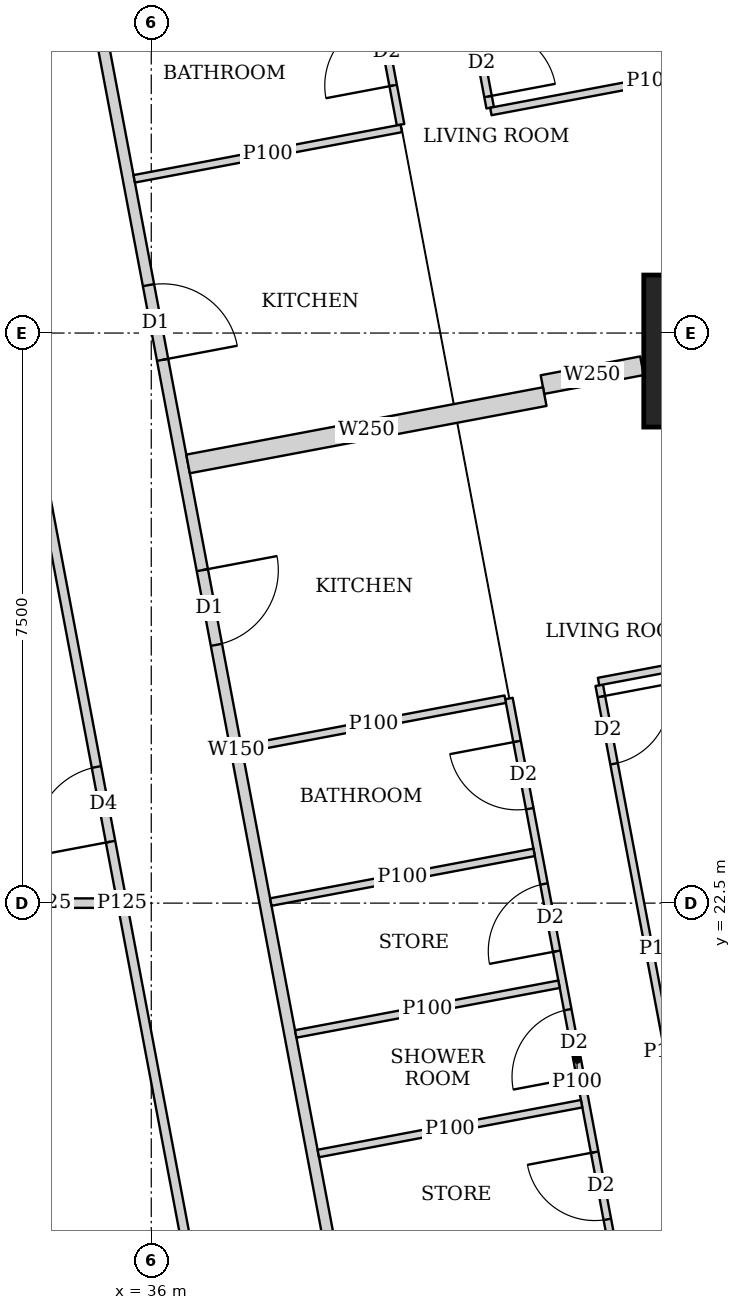
"""IFC4 building model, lengths in metres.
Left out: names, types, materials, properties, quantities, classifications, styles, units other than length and angle.
Written with IfcOpenShell. Run it as: python <this file> out.ifc"""

import sys

from ifc_helpers import new_model, si_unit, direction, frame, frame_2d, origin, origin_2d, place, context, subcontext, project, spatial, rectangle, extrude, element, fill, save


model = new_model("IFC4")
c1 = context("Model", 3, precision=1e-05, world=origin(), true_north=direction((0.0, 1.0)))
c2 = subcontext(c1, "Body", "Model", "MODEL_VIEW")
j1 = project(units=[si_unit("LENGTHUNIT", "METRE"), si_unit("PLANEANGLEUNIT", "RADIAN")], contexts=[c1])
p1 = place(None, origin())
s1 = spatial("IfcSite", under=j1, at=p1, CompositionType="ELEMENT")
p2 = place(p1, origin())
s2 = spatial("IfcBuilding", under=s1, at=p2, CompositionType="ELEMENT")
p3 = place(p2, frame((0.0, 0.0, 281.6)))
s3 = spatial("IfcBuildingStorey", under=s2, at=p3, CompositionType="ELEMENT", Elevation=281.6)
p4 = place(p3, frame((43.48, 29.763, 0.0), z_axis=(0.0, 0.0, 1.0), x_axis=(1.0, 0.0, 0.0)))
e1 = element("IfcColumn", 1, at=p4, inside=s3, PredefinedType="COLUMN", context=c2, shape_type="SweptSolid", body=[
    extrude(rectangle(XDim=2.0, YDim=2.0, at=origin_2d()), origin(), (0.0, 0.0, 1.0), 3.75),
])
p5 = place(p3, frame((33.781, 42.186, 0.0), z_axis=(0.0, 0.0, 1.0), x_axis=(0.185593518645, -0.9826266055, 0.0)))
e2 = element("IfcWall", 2, at=p5, inside=s3, PredefinedType="SOLIDWALL", context=c2, shape_type="SweptSolid", body=[
    extrude(rectangle(XDim=35.961, YDim=0.15, at=frame_2d((17.98, 0.0))), origin(), (0.0, 0.0, 1.0), 2.5),
])
p6 = place(p5, frame((11.76, 0.0, 0.0)))
e3 = element("IfcOpeningElement", 3, at=p6, cuts=e2, PredefinedType="OPENING", context=c2, shape_type="SweptSolid", body=[
    extrude(rectangle(XDim=1.0, YDim=2.1, at=frame_2d((0.5, 1.05))), frame((0.0, 0.085, 0.0), z_axis=(0.0, -1.0, 0.0), x_axis=(1.0, 0.0, 0.0)), (0.0, 0.0, 1.0), 0.17),
])
p7 = place(p5, frame((15.576, 0.0, 0.0)))
e4 = element("IfcOpeningElement", 4, at=p7, cuts=e2, PredefinedType="OPENING", context=c2, shape_type="SweptSolid", body=[
    extrude(rectangle(XDim=1.0, YDim=2.1, at=frame_2d((0.5, 1.05))), frame((0.0, 0.085, 0.0), z_axis=(0.0, -1.0, 0.0), x_axis=(1.0, 0.0, 0.0)), (0.0, 0.0, 1.0), 0.17),
])
p8 = place(p5, frame((30.502, 0.0, 0.0)))
e5 = element("IfcOpeningElement", 5, at=p8, cuts=e2, PredefinedType="OPENING", context=c2, shape_type="SweptSolid", body=[
    extrude(rectangle(XDim=1.0, YDim=2.1, at=frame_2d((0.5, 1.05))), frame((0.0, 0.085, 0.0), z_axis=(0.0, -1.0, 0.0), x_axis=(1.0, 0.0, 0.0)), (0.0, 0.0, 1.0), 0.17),
])
p9 = place(p3, frame((38.744, 42.045, 0.0), z_axis=(0.0, 0.0, 1.0), x_axis=(0.185588352162, -0.982627581305, 0.0)))
e6 = element("IfcWall", 6, at=p9, inside=s3, PredefinedType="PARTITIONING", context=c2, shape_type="SweptSolid", body=[
    extrude(rectangle(XDim=9.241, YDim=0.1, at=frame_2d((4.621, 0.0))), origin(), (0.0, 0.0, 1.0), 3.5),
])
p10 = place(p9, frame((8.191, 0.0, 0.0)))
e7 = element("IfcOpeningElement", 7, at=p10, cuts=e6, PredefinedType="OPENING", context=c2, shape_type="SweptSolid", body=[
    extrude(rectangle(XDim=0.9, YDim=2.1, at=frame_2d((0.45, 1.05))), frame((0.0, 0.06, 0.0), z_axis=(0.0, -1.0, 0.0), x_axis=(1.0, 0.0, 0.0)), (0.0, 0.0, 1.0), 0.12),
])
p11 = place(p9, frame((4.215, 0.0, 0.0)))
e8 = element("IfcOpeningElement", 8, at=p11, cuts=e6, PredefinedType="OPENING", context=c2, shape_type="SweptSolid", body=[
    extrude(rectangle(XDim=0.9, YDim=2.1, at=frame_2d((0.45, 1.05))), frame((0.0, 0.06, 0.0), z_axis=(0.0, -1.0, 0.0), x_axis=(1.0, 0.0, 0.0)), (0.0, 0.0, 1.0), 0.12),
])
p12 = place(p3, frame((37.51, 42.109, 0.0), z_axis=(0.0, 0.0, 1.0), x_axis=(0.185659798122, -0.982614084654, 0.0)))
e9 = element("IfcWall", 9, at=p12, inside=s3, PredefinedType="PARTITIONING", context=c2, shape_type="SweptSolid", body=[
    extrude(rectangle(XDim=9.534, YDim=0.1, at=frame_2d((4.767, 0.0))), origin(), (0.0, 0.0, 1.0), 3.5),
])
p13 = place(p12, frame((8.109, 0.0, 0.0)))
e10 = element("IfcOpeningElement", 10, at=p13, cuts=e9, PredefinedType="OPENING", context=c2, shape_type="SweptSolid", body=[
    extrude(rectangle(XDim=0.9, YDim=2.1, at=frame_2d((0.45, 1.05))), frame((0.0, 0.06, 0.0), z_axis=(0.0, -1.0, 0.0), x_axis=(1.0, 0.0, 0.0)), (0.0, 0.0, 1.0), 0.12),
])
p14 = place(p12, frame((2.65, 0.0, 0.0)))
e11 = element("IfcOpeningElement", 11, at=p14, cuts=e9, PredefinedType="OPENING", context=c2, shape_type="SweptSolid", body=[
    extrude(rectangle(XDim=0.9, YDim=2.1, at=frame_2d((0.45, 1.05))), frame((0.0, 0.06, 0.0), z_axis=(0.0, -1.0, 0.0), x_axis=(1.0, 0.0, 0.0)), (0.0, 0.0, 1.0), 0.12),
])
p15 = place(p12, frame((5.44, 0.0, 0.0)))
e12 = element("IfcOpeningElement", 12, at=p15, cuts=e9, PredefinedType="OPENING", context=c2, shape_type="SweptSolid", body=[
    extrude(rectangle(XDim=0.9, YDim=2.1, at=frame_2d((0.45, 1.05))), frame((0.0, 0.06, 0.0), z_axis=(0.0, -1.0, 0.0), x_axis=(1.0, 0.0, 0.0)), (0.0, 0.0, 1.0), 0.12),
])
p16 = place(p3, frame((44.693, 33.713, 0.0), z_axis=(0.0, 0.0, 1.0), x_axis=(-0.982633535512, -0.185556823879, 0.0)))
e13 = element("IfcWall", 13, at=p16, inside=s3, PredefinedType="PARTITIONING", context=c2, shape_type="SweptSolid", body=[
    extrude(rectangle(XDim=4.3, YDim=0.1, at=frame_2d((2.15, 0.0))), origin(), (0.0, 0.0, 1.0), 2.5),
])
p17 = place(p3, frame((39.289, 32.692, 0.0), z_axis=(0.0, 0.0, 1.0), x_axis=(-0.982662827464, -0.185401638399, 0.0)))
e14 = element("IfcWall", 14, at=p17, inside=s3, PredefinedType="PARTITIONING", context=c2, shape_type="SweptSolid", body=[
    extrude(rectangle(XDim=3.575, YDim=0.1, at=frame_2d((1.788, 0.0))), origin(), (0.0, 0.0, 1.0), 3.5),
])
p18 = place(p3, frame((41.894, 25.366, 0.0), z_axis=(0.0, 0.0, 1.0), x_axis=(0.185612905165, -0.982622943675, 0.0)))
e15 = element("IfcWall", 15, at=p18, inside=s3, PredefinedType="PARTITIONING", context=c2, shape_type="SweptSolid", body=[
    extrude(rectangle(XDim=9.827, YDim=0.1, at=frame_2d((4.913, 0.0))), origin(), (0.0, 0.0, 1.0), 2.5),
])
p19 = place(p18, frame((0.151, 0.0, 0.0)))
e16 = element("IfcOpeningElement", 16, at=p19, cuts=e15, PredefinedType="OPENING", context=c2, shape_type="SweptSolid", body=[
    extrude(rectangle(XDim=0.9, YDim=2.1, at=frame_2d((0.45, 1.05))), frame((0.0, 0.06, 0.0), z_axis=(0.0, -1.0, 0.0), x_axis=(1.0, 0.0, 0.0)), (0.0, 0.0, 1.0), 0.12),
])
p20 = place(p18, frame((5.05, 0.0, 0.0)))
e17 = element("IfcOpeningElement", 17, at=p20, cuts=e15, PredefinedType="OPENING", context=c2, shape_type="SweptSolid", body=[
    extrude(rectangle(XDim=0.9, YDim=2.1, at=frame_2d((0.45, 1.05))), frame((0.0, 0.06, 0.0), z_axis=(0.0, -1.0, 0.0), x_axis=(1.0, 0.0, 0.0)), (0.0, 0.0, 1.0), 0.12),
])
p21 = place(p18, frame((7.783, 0.0, 0.0)))
e18 = element("IfcOpeningElement", 18, at=p21, cuts=e15, PredefinedType="OPENING", context=c2, shape_type="SweptSolid", body=[
    extrude(rectangle(XDim=0.9, YDim=2.1, at=frame_2d((0.45, 1.05))), frame((0.0, 0.06, 0.0), z_axis=(0.0, -1.0, 0.0), x_axis=(1.0, 0.0, 0.0)), (0.0, 0.0, 1.0), 0.12),
])
p22 = place(p3, frame((40.706, 25.192, 0.0), z_axis=(0.0, 0.0, 1.0), x_axis=(0.185629824463, -0.982619747547, 0.0)))
e19 = element("IfcWall", 19, at=p22, inside=s3, PredefinedType="PARTITIONING", context=c2, shape_type="SweptSolid", body=[
    extrude(rectangle(XDim=9.659, YDim=0.1, at=frame_2d((4.83, 0.0))), origin(), (0.0, 0.0, 1.0), 2.5),
])
p23 = place(p22, frame((0.575, 0.0, 0.0)))
e20 = element("IfcOpeningElement", 20, at=p23, cuts=e19, PredefinedType="OPENING", context=c2, shape_type="SweptSolid", body=[
    extrude(rectangle(XDim=0.9, YDim=2.1, at=frame_2d((0.45, 1.05))), frame((0.0, 0.06, 0.0), z_axis=(0.0, -1.0, 0.0), x_axis=(1.0, 0.0, 0.0)), (0.0, 0.0, 1.0), 0.12),
])
p24 = place(p22, frame((4.166, 0.0, 0.0)))
e21 = element("IfcOpeningElement", 21, at=p24, cuts=e19, PredefinedType="OPENING", context=c2, shape_type="SweptSolid", body=[
    extrude(rectangle(XDim=0.9, YDim=2.1, at=frame_2d((0.45, 1.05))), frame((0.0, 0.06, 0.0), z_axis=(0.0, -1.0, 0.0), x_axis=(1.0, 0.0, 0.0)), (0.0, 0.0, 1.0), 0.12),
])
p25 = place(p22, frame((2.483, 0.0, 0.0)))
e22 = element("IfcOpeningElement", 22, at=p25, cuts=e19, PredefinedType="OPENING", context=c2, shape_type="SweptSolid", body=[
    extrude(rectangle(XDim=0.9, YDim=2.1, at=frame_2d((0.45, 1.05))), frame((0.0, 0.06, 0.0), z_axis=(0.0, -1.0, 0.0), x_axis=(1.0, 0.0, 0.0)), (0.0, 0.0, 1.0), 0.12),
])
p26 = place(p22, frame((6.074, 0.0, 0.0)))
e23 = element("IfcOpeningElement", 23, at=p26, cuts=e19, PredefinedType="OPENING", context=c2, shape_type="SweptSolid", body=[
    extrude(rectangle(XDim=0.9, YDim=2.1, at=frame_2d((0.45, 1.05))), frame((0.0, 0.06, 0.0), z_axis=(0.0, -1.0, 0.0), x_axis=(1.0, 0.0, 0.0)), (0.0, 0.0, 1.0), 0.12),
])
p27 = place(p3, frame((46.11, 26.213, 0.0), z_axis=(0.0, 0.0, 1.0), x_axis=(-0.982633535512, -0.185556823879, 0.0)))
e24 = element("IfcWall", 24, at=p27, inside=s3, PredefinedType="PARTITIONING", context=c2, shape_type="SweptSolid", body=[
    extrude(rectangle(XDim=4.3, YDim=0.1, at=frame_2d((2.15, 0.0))), origin(), (0.0, 0.0, 1.0), 2.5),
])
p28 = place(p3, frame((42.887, 21.921, 0.0), z_axis=(0.0, 0.0, 1.0), x_axis=(-0.982688058078, -0.185267861514, 0.0)))
e25 = element("IfcWall", 25, at=p28, inside=s3, PredefinedType="PARTITIONING", context=c2, shape_type="SweptSolid", body=[
    extrude(rectangle(XDim=0.286, YDim=0.1, at=frame_2d((0.143, 0.0))), origin(), (0.0, 0.0, 1.0), 2.5),
])
p29 = place(p3, frame((40.657, 25.183, 0.0), z_axis=(0.0, 0.0, 1.0), x_axis=(-0.982585626838, -0.185810349366, 0.0)))
e26 = element("IfcWall", 26, at=p29, inside=s3, PredefinedType="PARTITIONING", context=c2, shape_type="SweptSolid", body=[
    extrude(rectangle(XDim=3.525, YDim=0.1, at=frame_2d((1.763, 0.0))), origin(), (0.0, 0.0, 1.0), 3.5),
])
p30 = place(p3, frame((41.365, 21.433, 0.0), z_axis=(0.0, 0.0, 1.0), x_axis=(-0.982638553676, -0.185530247748, 0.0)))
e27 = element("IfcWall", 27, at=p30, inside=s3, PredefinedType="PARTITIONING", context=c2, shape_type="SweptSolid", body=[
    extrude(rectangle(XDim=3.525, YDim=0.1, at=frame_2d((1.763, 0.0))), origin(), (0.0, 0.0, 1.0), 3.5),
])
p31 = place(p3, frame((41.037, 23.168, 0.0), z_axis=(0.0, 0.0, 1.0), x_axis=(-0.982638553676, -0.185530247748, 0.0)))
e28 = element("IfcWall", 28, at=p31, inside=s3, PredefinedType="PARTITIONING", context=c2, shape_type="SweptSolid", body=[
    extrude(rectangle(XDim=3.525, YDim=0.1, at=frame_2d((1.763, 0.0))), origin(), (0.0, 0.0, 1.0), 2.5),
])
p32 = place(p3, frame((41.662, 19.861, 0.0), z_axis=(0.0, 0.0, 1.0), x_axis=(-0.982588017646, -0.185797706064, 0.0)))
e29 = element("IfcWall", 29, at=p32, inside=s3, PredefinedType="PARTITIONING", context=c2, shape_type="SweptSolid", body=[
    extrude(rectangle(XDim=3.525, YDim=0.1, at=frame_2d((1.763, 0.0))), origin(), (0.0, 0.0, 1.0), 3.5),
])
p33 = place(p3, frame((42.456, 29.57, 0.0), z_axis=(0.0, 0.0, 1.0), x_axis=(-0.982517742323, -0.18616897169, 0.0)))
e30 = element("IfcWall", 30, at=p33, inside=s3, PredefinedType="SOLIDWALL", context=c2, shape_type="SweptSolid", body=[
    extrude(rectangle(XDim=1.332, YDim=0.25, at=frame_2d((0.666, 0.0))), origin(), (0.0, 0.0, 1.0), 2.5),
])
p34 = place(p3, frame((41.177, 29.164, 0.0), z_axis=(0.0, 0.0, 1.0), x_axis=(-0.982642846239, -0.185507511263, 0.0)))
e31 = element("IfcWall", 31, at=p34, inside=s3, PredefinedType="SOLIDWALL", context=c2, shape_type="SweptSolid", body=[
    extrude(rectangle(XDim=4.776, YDim=0.25, at=frame_2d((2.388, 0.0))), origin(), (0.0, 0.0, 1.0), 2.5),
])
p35 = place(p3, frame((37.947, 10.163, 0.0), z_axis=(0.0, 0.0, 1.0), x_axis=(-0.185572770922, 0.982630523998, 0.0)))
e32 = element("IfcWall", 32, at=p35, inside=s3, PredefinedType="PARTITIONING", context=c2, shape_type="SweptSolid", body=[
    extrude(rectangle(XDim=25.111, YDim=0.125, at=frame_2d((12.556, 0.0))), origin(), (0.0, 0.0, 1.0), 2.5),
])
p36 = place(p35, frame((0.708, 0.0, 0.0)))
e33 = element("IfcOpeningElement", 33, at=p36, cuts=e32, PredefinedType="OPENING", context=c2, shape_type="SweptSolid", body=[
    extrude(rectangle(XDim=1.0, YDim=2.1, at=frame_2d((0.5, 1.05))), frame((0.0, 0.073, 0.0), z_axis=(0.0, -1.0, 0.0), x_axis=(1.0, 0.0, 0.0)), (0.0, 0.0, 1.0), 0.145),
])
p37 = place(p35, frame((5.9, 0.0, 0.0)))
e34 = element("IfcOpeningElement", 34, at=p37, cuts=e32, PredefinedType="OPENING", context=c2, shape_type="SweptSolid", body=[
    extrude(rectangle(XDim=1.0, YDim=2.1, at=frame_2d((0.5, 1.05))), frame((0.0, 0.073, 0.0), z_axis=(0.0, -1.0, 0.0), x_axis=(1.0, 0.0, 0.0)), (0.0, 0.0, 1.0), 0.145),
])
p38 = place(p35, frame((13.378, 0.0, 0.0)))
e35 = element("IfcOpeningElement", 35, at=p38, cuts=e32, PredefinedType="OPENING", context=c2, shape_type="SweptSolid", body=[
    extrude(rectangle(XDim=1.0, YDim=2.1, at=frame_2d((0.5, 1.05))), frame((0.0, 0.073, 0.0), z_axis=(0.0, -1.0, 0.0), x_axis=(1.0, 0.0, 0.0)), (0.0, 0.0, 1.0), 0.145),
])
p39 = place(p35, frame((21.15, 0.0, 0.0)))
e36 = element("IfcOpeningElement", 36, at=p39, cuts=e32, PredefinedType="OPENING", context=c2, shape_type="SweptSolid", body=[
    extrude(rectangle(XDim=1.0, YDim=2.1, at=frame_2d((0.5, 1.05))), frame((0.0, 0.073, 0.0), z_axis=(0.0, -1.0, 0.0), x_axis=(1.0, 0.0, 0.0)), (0.0, 0.0, 1.0), 0.145),
])
p40 = place(p3, frame((33.701, 22.5, 0.0), z_axis=(0.0, 0.0, 1.0), x_axis=(1.0, 0.0, 0.0)))
e37 = element("IfcWall", 37, at=p40, inside=s3, PredefinedType="PARTITIONING", context=c2, shape_type="SweptSolid", body=[
    extrude(rectangle(XDim=1.841, YDim=0.125, at=frame_2d((0.92, 0.0))), origin(), (0.0, 0.0, 1.0), 2.5),
])
p41 = place(p10, origin())
e38 = element("IfcDoor", 38, at=p41, inside=s3, OperationType="SINGLE_SWING_RIGHT", PredefinedType="DOOR", context=c2, shape_type="SweptSolid", body=[
    extrude(rectangle(XDim=0.9, YDim=2.1, at=frame_2d((0.45, 1.05))), frame((0.0, 0.025, 0.0), z_axis=(0.0, -1.0, 0.0), x_axis=(1.0, 0.0, 0.0)), (0.0, 0.0, 1.0), 0.05),
])
fill(e7, e38)
p42 = place(p13, origin())
e39 = element("IfcDoor", 39, at=p42, inside=s3, OperationType="SINGLE_SWING_LEFT", PredefinedType="DOOR", context=c2, shape_type="SweptSolid", body=[
    extrude(rectangle(XDim=0.9, YDim=2.1, at=frame_2d((0.45, 1.05))), frame((0.0, 0.025, 0.0), z_axis=(0.0, -1.0, 0.0), x_axis=(1.0, 0.0, 0.0)), (0.0, 0.0, 1.0), 0.05),
])
fill(e10, e39)
p43 = place(p6, origin())
e40 = element("IfcDoor", 40, at=p43, inside=s3, OperationType="SINGLE_SWING_RIGHT", PredefinedType="DOOR", context=c2, shape_type="SweptSolid", body=[
    extrude(rectangle(XDim=1.0, YDim=2.1, at=frame_2d((0.5, 1.05))), frame((0.0, 0.025, 0.0), z_axis=(0.0, -1.0, 0.0), x_axis=(1.0, 0.0, 0.0)), (0.0, 0.0, 1.0), 0.05),
])
fill(e3, e40)
p44 = place(p19, origin())
e41 = element("IfcDoor", 41, at=p44, inside=s3, OperationType="SINGLE_SWING_LEFT", PredefinedType="DOOR", context=c2, shape_type="SweptSolid", body=[
    extrude(rectangle(XDim=0.9, YDim=2.1, at=frame_2d((0.45, 1.05))), frame((0.0, 0.025, 0.0), z_axis=(0.0, -1.0, 0.0), x_axis=(1.0, 0.0, 0.0)), (0.0, 0.0, 1.0), 0.05),
])
fill(e16, e41)
p45 = place(p23, origin())
e42 = element("IfcDoor", 42, at=p45, inside=s3, OperationType="SINGLE_SWING_RIGHT", PredefinedType="DOOR", context=c2, shape_type="SweptSolid", body=[
    extrude(rectangle(XDim=0.9, YDim=2.1, at=frame_2d((0.45, 1.05))), frame((0.0, 0.025, 0.0), z_axis=(0.0, -1.0, 0.0), x_axis=(1.0, 0.0, 0.0)), (0.0, 0.0, 1.0), 0.05),
])
fill(e20, e42)
p46 = place(p24, origin())
e43 = element("IfcDoor", 43, at=p46, inside=s3, OperationType="SINGLE_SWING_LEFT", PredefinedType="DOOR", context=c2, shape_type="SweptSolid", body=[
    extrude(rectangle(XDim=0.9, YDim=2.1, at=frame_2d((0.45, 1.05))), frame((0.0, 0.025, 0.0), z_axis=(0.0, -1.0, 0.0), x_axis=(1.0, 0.0, 0.0)), (0.0, 0.0, 1.0), 0.05),
])
fill(e21, e43)
p47 = place(p25, origin())
e44 = element("IfcDoor", 44, at=p47, inside=s3, OperationType="SINGLE_SWING_LEFT", PredefinedType="DOOR", context=c2, shape_type="SweptSolid", body=[
    extrude(rectangle(XDim=0.9, YDim=2.1, at=frame_2d((0.45, 1.05))), frame((0.0, 0.025, 0.0), z_axis=(0.0, -1.0, 0.0), x_axis=(1.0, 0.0, 0.0)), (0.0, 0.0, 1.0), 0.05),
])
fill(e22, e44)
p48 = place(p26, origin())
e45 = element("IfcDoor", 45, at=p48, inside=s3, OperationType="SINGLE_SWING_RIGHT", PredefinedType="DOOR", context=c2, shape_type="SweptSolid", body=[
    extrude(rectangle(XDim=0.9, YDim=2.1, at=frame_2d((0.45, 1.05))), frame((0.0, 0.025, 0.0), z_axis=(0.0, -1.0, 0.0), x_axis=(1.0, 0.0, 0.0)), (0.0, 0.0, 1.0), 0.05),
])
fill(e23, e45)
p49 = place(p7, origin())
e46 = element("IfcDoor", 46, at=p49, inside=s3, OperationType="SINGLE_SWING_LEFT", PredefinedType="DOOR", context=c2, shape_type="SweptSolid", body=[
    extrude(rectangle(XDim=1.0, YDim=2.1, at=frame_2d((0.5, 1.05))), frame((0.0, 0.025, 0.0), z_axis=(0.0, -1.0, 0.0), x_axis=(1.0, 0.0, 0.0)), (0.0, 0.0, 1.0), 0.05),
])
fill(e4, e46)
p50 = place(p38, origin())
e47 = element("IfcDoor", 47, at=p50, inside=s3, OperationType="SINGLE_SWING_LEFT", PredefinedType="DOOR", context=c2, shape_type="SweptSolid", body=[
    extrude(rectangle(XDim=1.0, YDim=2.1, at=frame_2d((0.5, 1.05))), frame((0.0, 0.025, 0.0), z_axis=(0.0, -1.0, 0.0), x_axis=(1.0, 0.0, 0.0)), (0.0, 0.0, 1.0), 0.05),
])
fill(e35, e47)
save(model, sys.argv[1])
